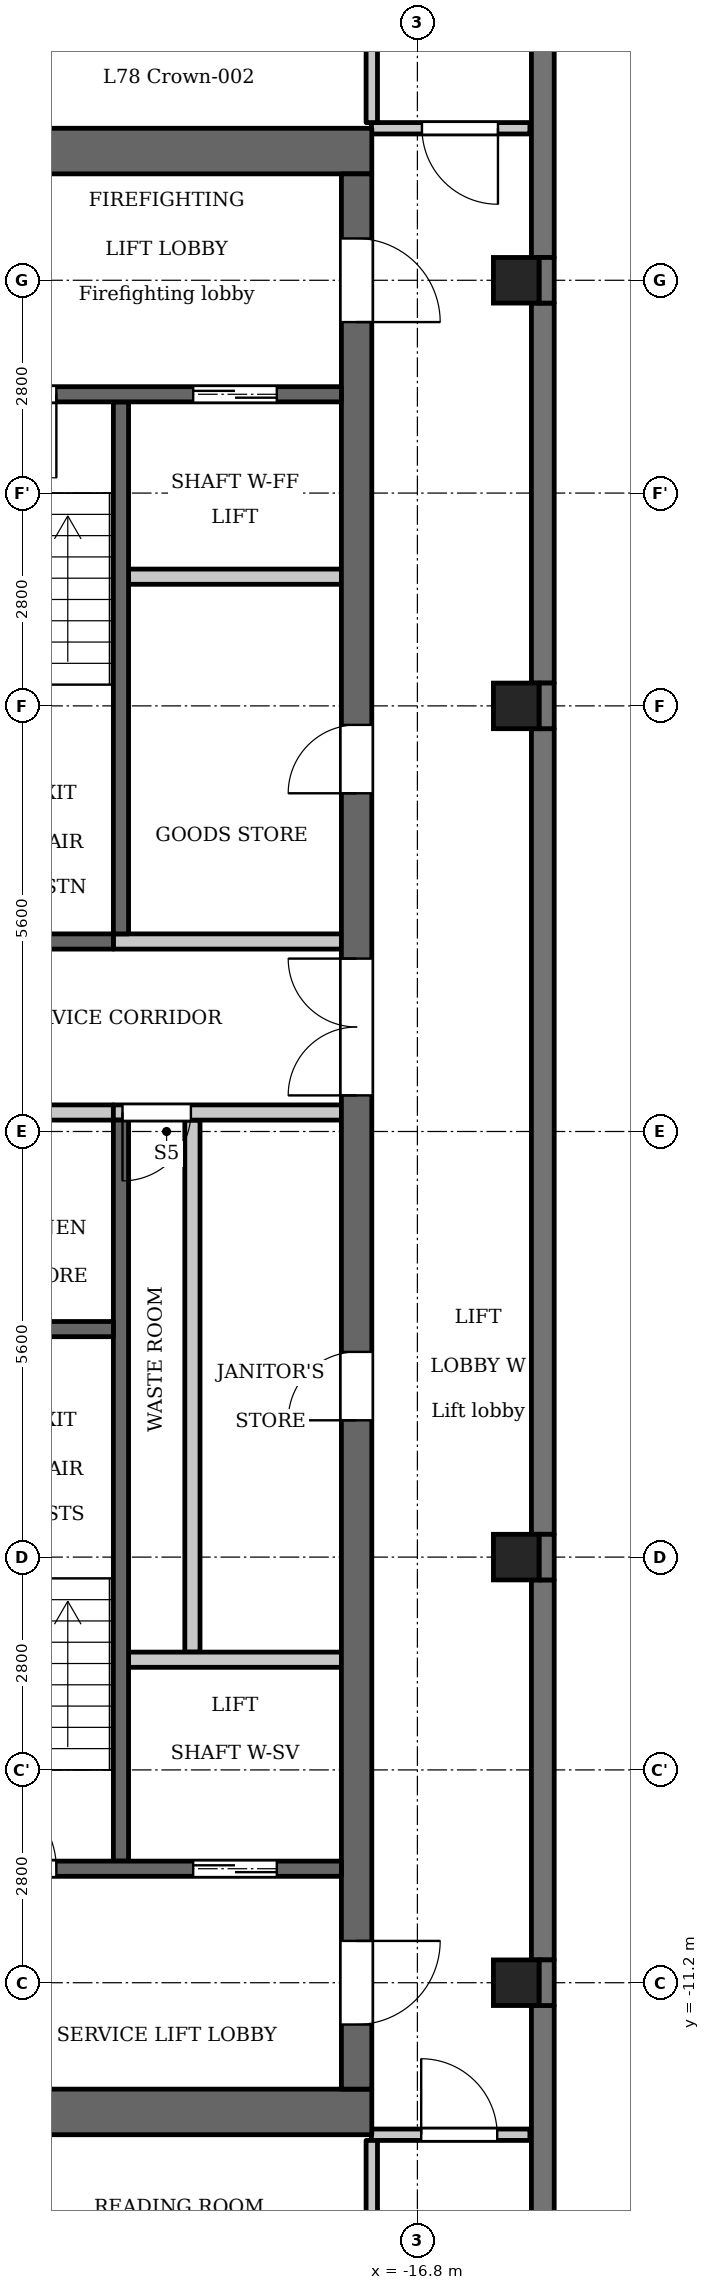
"""IFC4 building model, lengths in metres.
Left out: names, types, materials, properties, quantities, classifications, styles, units other than length and angle.
Written with IfcOpenShell. Run it as: python <this file> out.ifc"""

import sys

from ifc_helpers import new_model, si_unit, direction, frame, frame_2d, origin, origin_2d, place, context, subcontext, project, spatial, polyline, rectangle, outline, extrude, element, fill, save


model = new_model("IFC4")
c1 = context("Model", 3, precision=1e-05, world=origin(), true_north=direction((0.0, 1.0)))
c2 = subcontext(c1, "Body", "Model", "MODEL_VIEW")
j1 = project(units=[si_unit("LENGTHUNIT", "METRE"), si_unit("PLANEANGLEUNIT", "RADIAN")], contexts=[c1])
p1 = place(None, origin())
s1 = spatial("IfcSite", under=j1, at=p1, CompositionType="ELEMENT")
p2 = place(p1, origin())
s2 = spatial("IfcBuilding", under=s1, at=p2, CompositionType="ELEMENT")
p3 = place(p2, frame((0.0, 0.0, 303.4)))
s3 = spatial("IfcBuildingStorey", under=s2, at=p3, CompositionType="ELEMENT", Elevation=303.4)
for number, where, z_axis, x_axis in (
    (1, (-15.5, -11.2, 0.0), (0.0, 0.0, 1.0), (1.0, 0.0, 0.0)),
    (2, (-15.5, -5.6, 0.0), (0.0, 0.0, 1.0), (1.0, 0.0, 0.0)),
    (3, (-15.5, 5.6, 0.0), (0.0, 0.0, 1.0), (1.0, 0.0, 0.0)),
    (4, (-15.5, 11.2, 0.0), (0.0, 0.0, 1.0), (1.0, 0.0, 0.0)),
):
    element("IfcColumn", number, at=place(p3, frame(where, z_axis=z_axis, x_axis=x_axis)), inside=s3, PredefinedType="COLUMN", context=c2, shape_type="SweptSolid", body=[
        extrude(rectangle(XDim=0.6, YDim=0.6, at=origin_2d()), origin(), (0.0, 0.0, 1.0), 3.5),
    ])
p4 = place(p3, frame((-15.15, -18.8, 0.0), z_axis=(0.0, 0.0, 1.0), x_axis=(0.0, 1.0, 0.0)))
e5 = element("IfcWall", 5, at=p4, inside=s3, PredefinedType="SOLIDWALL", context=c2, shape_type="SweptSolid", body=[
    extrude(rectangle(XDim=7.3, YDim=0.3, at=frame_2d((3.65, 0.0))), origin(), (0.0, 0.0, 1.0), 3.2),
])
p5 = place(p4, frame((1.863, 0.0, 0.9)))
e6 = element("IfcOpeningElement", 6, at=p5, cuts=e5, PredefinedType="OPENING", context=c2, shape_type="SweptSolid", body=[
    extrude(rectangle(XDim=1.8, YDim=1.25, at=frame_2d((0.9, 0.625))), frame((0.0, 0.16, 0.0), z_axis=(0.0, -1.0, 0.0), x_axis=(1.0, 0.0, 0.0)), (0.0, 0.0, 1.0), 0.32),
])
p6 = place(p3, frame((-15.15, -10.9, 0.0), z_axis=(0.0, 0.0, 1.0), x_axis=(0.0, 1.0, 0.0)))
e7 = element("IfcWall", 7, at=p6, inside=s3, PredefinedType="SOLIDWALL", context=c2, shape_type="SweptSolid", body=[
    extrude(rectangle(XDim=5.0, YDim=0.3, at=frame_2d((2.5, 0.0))), origin(), (0.0, 0.0, 1.0), 3.2),
])
p7 = place(p3, frame((-15.15, -5.3, 0.0), z_axis=(0.0, 0.0, 1.0), x_axis=(0.0, 1.0, 0.0)))
e8 = element("IfcWall", 8, at=p7, inside=s3, PredefinedType="SOLIDWALL", context=c2, shape_type="SweptSolid", body=[
    extrude(rectangle(XDim=10.6, YDim=0.3, at=frame_2d((5.3, 0.0))), origin(), (0.0, 0.0, 1.0), 3.2),
])
p8 = place(p3, frame((-15.15, 5.9, 0.0), z_axis=(0.0, 0.0, 1.0), x_axis=(0.0, 1.0, 0.0)))
e9 = element("IfcWall", 9, at=p8, inside=s3, PredefinedType="SOLIDWALL", context=c2, shape_type="SweptSolid", body=[
    extrude(rectangle(XDim=5.0, YDim=0.3, at=frame_2d((2.5, 0.0))), origin(), (0.0, 0.0, 1.0), 3.2),
])
p9 = place(p3, frame((-15.15, 11.5, 0.0), z_axis=(0.0, 0.0, 1.0), x_axis=(0.0, 1.0, 0.0)))
e10 = element("IfcWall", 10, at=p9, inside=s3, PredefinedType="SOLIDWALL", context=c2, shape_type="SweptSolid", body=[
    extrude(rectangle(XDim=7.3, YDim=0.3, at=frame_2d((3.65, 0.0))), origin(), (0.0, 0.0, 1.0), 3.2),
])
p10 = place(p9, frame((3.637, 0.0, 0.9)))
e11 = element("IfcOpeningElement", 11, at=p10, cuts=e10, PredefinedType="OPENING", context=c2, shape_type="SweptSolid", body=[
    extrude(rectangle(XDim=1.8, YDim=1.25, at=frame_2d((0.9, 0.625))), frame((0.0, 0.16, 0.0), z_axis=(0.0, -1.0, 0.0), x_axis=(1.0, 0.0, 0.0)), (0.0, 0.0, 1.0), 0.32),
])
p11 = place(p3, frame((-20.7, 2.6, 0.0), z_axis=(0.0, 0.0, 1.0), x_axis=(0.0, 1.0, 0.0)))
e12 = element("IfcWall", 12, at=p11, inside=s3, PredefinedType="SHEAR", context=c2, shape_type="SweptSolid", body=[
    extrude(rectangle(XDim=7.0, YDim=0.2, at=frame_2d((3.5, 0.0))), origin(), (0.0, 0.0, 1.0), 3.2),
])
p12 = place(p3, frame((-20.7, -9.6, 0.0), z_axis=(0.0, 0.0, 1.0), x_axis=(0.0, 1.0, 0.0)))
e13 = element("IfcWall", 13, at=p12, inside=s3, PredefinedType="SHEAR", context=c2, shape_type="SweptSolid", body=[
    extrude(rectangle(XDim=9.75, YDim=0.2, at=frame_2d((4.875, 0.0))), origin(), (0.0, 0.0, 1.0), 3.2),
])
p13 = place(p3, frame((-20.8, 2.5, 0.0), z_axis=(0.0, 0.0, 1.0), x_axis=(-1.0, 0.0, 0.0)))
e14 = element("IfcWall", 14, at=p13, inside=s3, PredefinedType="SHEAR", context=c2, shape_type="SweptSolid", body=[
    extrude(rectangle(XDim=2.8, YDim=0.2, at=frame_2d((1.4, 0.0))), origin(), (0.0, 0.0, 1.0), 3.2),
])
p14 = place(p3, frame((-20.8, 0.25, 0.0), z_axis=(0.0, 0.0, 1.0), x_axis=(-1.0, 0.0, 0.0)))
e15 = element("IfcWall", 15, at=p14, inside=s3, PredefinedType="PARTITIONING", context=c2, shape_type="SweptSolid", body=[
    extrude(rectangle(XDim=2.8, YDim=0.2, at=frame_2d((1.4, 0.0))), origin(), (0.0, 0.0, 1.0), 3.2),
])
p15 = place(p14, frame((0.95, 0.0, 0.0)))
e16 = element("IfcOpeningElement", 16, at=p15, cuts=e15, PredefinedType="OPENING", context=c2, shape_type="SweptSolid", body=[
    extrude(rectangle(XDim=0.9, YDim=2.1, at=frame_2d((0.45, 1.05))), frame((0.0, 0.11, 0.0), z_axis=(0.0, -1.0, 0.0), x_axis=(1.0, 0.0, 0.0)), (0.0, 0.0, 1.0), 0.22),
])
for number, where, z_axis, x_axis in (
    (17, (-17.4, 12.9, 0.0), (0.0, 0.0, 1.0), (-1.0, 0.0, 0.0)),
    (18, (-17.4, -12.9, 0.0), (0.0, 0.0, 1.0), (-1.0, 0.0, 0.0)),
):
    element("IfcWall", number, at=place(p3, frame(where, z_axis=z_axis, x_axis=x_axis)), inside=s3, PredefinedType="SHEAR", context=c2, shape_type="SweptSolid", body=[
        extrude(rectangle(XDim=7.6, YDim=0.6, at=frame_2d((3.8, 0.0))), origin(), (0.0, 0.0, 1.0), 3.2),
    ])
p16 = place(p3, frame((-19.76, -6.85, 0.0), z_axis=(0.0, 0.0, 1.0), x_axis=(0.0, 1.0, 0.0)))
e19 = element("IfcWall", 19, at=p16, inside=s3, PredefinedType="PARTITIONING", context=c2, shape_type="SweptSolid", body=[
    extrude(rectangle(XDim=7.0, YDim=0.2, at=frame_2d((3.5, 0.0))), origin(), (0.0, 0.0, 1.0), 3.2),
])
p17 = place(p3, frame((-17.6, -12.6, 0.0), z_axis=(0.0, 0.0, 1.0), x_axis=(0.0, 1.0, 0.0)))
e20 = element("IfcWall", 20, at=p17, inside=s3, PredefinedType="SHEAR", context=c2, shape_type="SweptSolid", body=[
    extrude(rectangle(XDim=25.2, YDim=0.4, at=frame_2d((12.6, 0.0))), origin(), (0.0, 0.0, 1.0), 3.2),
])
p18 = place(p17, frame((8.8, 0.0, 0.0)))
e21 = element("IfcOpeningElement", 21, at=p18, cuts=e20, PredefinedType="OPENING", context=c2, shape_type="SweptSolid", body=[
    extrude(rectangle(XDim=0.9, YDim=2.1, at=frame_2d((0.45, 1.05))), frame((0.0, 0.21, 0.0), z_axis=(0.0, -1.0, 0.0), x_axis=(1.0, 0.0, 0.0)), (0.0, 0.0, 1.0), 0.42),
])
p19 = place(p17, frame((17.05, 0.0, 0.0)))
e22 = element("IfcOpeningElement", 22, at=p19, cuts=e20, PredefinedType="OPENING", context=c2, shape_type="SweptSolid", body=[
    extrude(rectangle(XDim=0.9, YDim=2.1, at=frame_2d((0.45, 1.05))), frame((0.0, 0.21, 0.0), z_axis=(0.0, -1.0, 0.0), x_axis=(1.0, 0.0, 0.0)), (0.0, 0.0, 1.0), 0.42),
])
p20 = place(p17, frame((23.25, 0.0, 0.0)))
e23 = element("IfcOpeningElement", 23, at=p20, cuts=e20, PredefinedType="OPENING", context=c2, shape_type="SweptSolid", body=[
    extrude(rectangle(XDim=1.1, YDim=2.1, at=frame_2d((0.55, 1.05))), frame((0.0, 0.21, 0.0), z_axis=(0.0, -1.0, 0.0), x_axis=(1.0, 0.0, 0.0)), (0.0, 0.0, 1.0), 0.42),
])
p21 = place(p17, frame((0.85, 0.0, 0.0)))
e24 = element("IfcOpeningElement", 24, at=p21, cuts=e20, PredefinedType="OPENING", context=c2, shape_type="SweptSolid", body=[
    extrude(rectangle(XDim=1.1, YDim=2.1, at=frame_2d((0.55, 1.05))), frame((0.0, 0.21, 0.0), z_axis=(0.0, -1.0, 0.0), x_axis=(1.0, 0.0, 0.0)), (0.0, 0.0, 1.0), 0.42),
])
p22 = place(p17, frame((13.075, 0.0, 0.0)))
e25 = element("IfcOpeningElement", 25, at=p22, cuts=e20, PredefinedType="OPENING", context=c2, shape_type="SweptSolid", body=[
    extrude(rectangle(XDim=1.8, YDim=2.1, at=frame_2d((0.9, 1.05))), frame((0.0, 0.21, 0.0), z_axis=(0.0, -1.0, 0.0), x_axis=(1.0, 0.0, 0.0)), (0.0, 0.0, 1.0), 0.42),
])
p23 = place(p3, frame((-17.8, -9.7, 0.0), z_axis=(0.0, 0.0, 1.0), x_axis=(-1.0, 0.0, 0.0)))
e26 = element("IfcWall", 26, at=p23, inside=s3, PredefinedType="SHEAR", context=c2, shape_type="SweptSolid", body=[
    extrude(rectangle(XDim=5.8, YDim=0.2, at=frame_2d((2.9, 0.0))), origin(), (0.0, 0.0, 1.0), 3.2),
])
p24 = place(p23, frame((0.85, 0.0, 0.0)))
e27 = element("IfcOpeningElement", 27, at=p24, cuts=e26, PredefinedType="OPENING", context=c2, shape_type="SweptSolid", body=[
    extrude(rectangle(XDim=1.1, YDim=2.1, at=frame_2d((0.55, 1.05))), frame((0.0, 0.11, 0.0), z_axis=(0.0, -1.0, 0.0), x_axis=(1.0, 0.0, 0.0)), (0.0, 0.0, 1.0), 0.22),
])
p25 = place(p23, frame((3.75, 0.0, 0.0)))
e28 = element("IfcOpeningElement", 28, at=p25, cuts=e26, PredefinedType="OPENING", context=c2, shape_type="SweptSolid", body=[
    extrude(rectangle(XDim=1.1, YDim=2.1, at=frame_2d((0.55, 1.05))), frame((0.0, 0.11, 0.0), z_axis=(0.0, -1.0, 0.0), x_axis=(1.0, 0.0, 0.0)), (0.0, 0.0, 1.0), 0.22),
])
p26 = place(p3, frame((-17.8, -6.95, 0.0), z_axis=(0.0, 0.0, 1.0), x_axis=(-1.0, 0.0, 0.0)))
e29 = element("IfcWall", 29, at=p26, inside=s3, PredefinedType="PARTITIONING", context=c2, shape_type="SweptSolid", body=[
    extrude(rectangle(XDim=2.8, YDim=0.2, at=frame_2d((1.4, 0.0))), origin(), (0.0, 0.0, 1.0), 3.2),
])
p27 = place(p3, frame((-17.8, 0.25, 0.0), z_axis=(0.0, 0.0, 1.0), x_axis=(-1.0, 0.0, 0.0)))
e30 = element("IfcWall", 30, at=p27, inside=s3, PredefinedType="PARTITIONING", context=c2, shape_type="SweptSolid", body=[
    extrude(rectangle(XDim=3.0, YDim=0.2, at=frame_2d((1.5, 0.0))), origin(), (0.0, 0.0, 1.0), 3.2),
])
p28 = place(p27, frame((1.98, 0.0, 0.0)))
e31 = element("IfcOpeningElement", 31, at=p28, cuts=e30, PredefinedType="OPENING", context=c2, shape_type="SweptSolid", body=[
    extrude(rectangle(XDim=0.9, YDim=2.1, at=frame_2d((0.45, 1.05))), frame((0.0, 0.11, 0.0), z_axis=(0.0, -1.0, 0.0), x_axis=(1.0, 0.0, 0.0)), (0.0, 0.0, 1.0), 0.22),
])
p29 = place(p3, frame((-17.8, 2.5, 0.0), z_axis=(0.0, 0.0, 1.0), x_axis=(-1.0, 0.0, 0.0)))
e32 = element("IfcWall", 32, at=p29, inside=s3, PredefinedType="PARTITIONING", context=c2, shape_type="SweptSolid", body=[
    extrude(rectangle(XDim=3.0, YDim=0.2, at=frame_2d((1.5, 0.0))), origin(), (0.0, 0.0, 1.0), 3.2),
])
p30 = place(p3, frame((-17.8, 7.3, 0.0), z_axis=(0.0, 0.0, 1.0), x_axis=(-1.0, 0.0, 0.0)))
e33 = element("IfcWall", 33, at=p30, inside=s3, PredefinedType="PARTITIONING", context=c2, shape_type="SweptSolid", body=[
    extrude(rectangle(XDim=2.8, YDim=0.2, at=frame_2d((1.4, 0.0))), origin(), (0.0, 0.0, 1.0), 3.2),
])
p31 = place(p3, frame((-17.8, 9.7, 0.0), z_axis=(0.0, 0.0, 1.0), x_axis=(-1.0, 0.0, 0.0)))
e34 = element("IfcWall", 34, at=p31, inside=s3, PredefinedType="SHEAR", context=c2, shape_type="SweptSolid", body=[
    extrude(rectangle(XDim=5.8, YDim=0.2, at=frame_2d((2.9, 0.0))), origin(), (0.0, 0.0, 1.0), 3.2),
])
p32 = place(p31, frame((0.85, 0.0, 0.0)))
e35 = element("IfcOpeningElement", 35, at=p32, cuts=e34, PredefinedType="OPENING", context=c2, shape_type="SweptSolid", body=[
    extrude(rectangle(XDim=1.1, YDim=2.1, at=frame_2d((0.55, 1.05))), frame((0.0, 0.11, 0.0), z_axis=(0.0, -1.0, 0.0), x_axis=(1.0, 0.0, 0.0)), (0.0, 0.0, 1.0), 0.22),
])
p33 = place(p31, frame((3.75, 0.0, 0.0)))
e36 = element("IfcOpeningElement", 36, at=p33, cuts=e34, PredefinedType="OPENING", context=c2, shape_type="SweptSolid", body=[
    extrude(rectangle(XDim=1.1, YDim=2.1, at=frame_2d((0.55, 1.05))), frame((0.0, 0.11, 0.0), z_axis=(0.0, -1.0, 0.0), x_axis=(1.0, 0.0, 0.0)), (0.0, 0.0, 1.0), 0.22),
])
p34 = place(p3, frame((-20.8, -2.6, 0.0), z_axis=(0.0, 0.0, 1.0), x_axis=(-1.0, 0.0, 0.0)))
e37 = element("IfcWall", 37, at=p34, inside=s3, PredefinedType="SHEAR", context=c2, shape_type="SweptSolid", body=[
    extrude(rectangle(XDim=2.6, YDim=0.2, at=frame_2d((1.3, 0.0))), origin(), (0.0, 0.0, 1.0), 3.2),
])
p35 = place(p3, frame((-17.405, -13.2, 0.0), z_axis=(0.0, 0.0, 1.0), x_axis=(1.0, 0.0, 0.0)))
e38 = element("IfcWall", 38, at=p35, inside=s3, PredefinedType="PARTITIONING", context=c2, shape_type="SweptSolid", body=[
    extrude(rectangle(XDim=2.085, YDim=0.15, at=frame_2d((1.042, 0.0))), origin(), (0.0, 0.0, 1.0), 3.2),
])
p36 = place(p35, frame((0.655, 0.0, 0.0)))
e39 = element("IfcOpeningElement", 39, at=p36, cuts=e38, PredefinedType="OPENING", context=c2, shape_type="SweptSolid", body=[
    extrude(rectangle(XDim=1.0, YDim=2.1, at=frame_2d((0.5, 1.05))), frame((0.0, 0.085, 0.0), z_axis=(0.0, -1.0, 0.0), x_axis=(1.0, 0.0, 0.0)), (0.0, 0.0, 1.0), 0.17),
])
p37 = place(p3, frame((-17.405, 13.2, 0.0), z_axis=(0.0, 0.0, 1.0), x_axis=(1.0, 0.0, 0.0)))
e40 = element("IfcWall", 40, at=p37, inside=s3, PredefinedType="PARTITIONING", context=c2, shape_type="SweptSolid", body=[
    extrude(rectangle(XDim=2.085, YDim=0.15, at=frame_2d((1.042, 0.0))), origin(), (0.0, 0.0, 1.0), 3.2),
])
p38 = place(p37, frame((0.665, 0.0, 0.0)))
e41 = element("IfcOpeningElement", 41, at=p38, cuts=e40, PredefinedType="OPENING", context=c2, shape_type="SweptSolid", body=[
    extrude(rectangle(XDim=1.0, YDim=2.1, at=frame_2d((0.5, 1.05))), frame((0.0, 0.085, 0.0), z_axis=(0.0, -1.0, 0.0), x_axis=(1.0, 0.0, 0.0)), (0.0, 0.0, 1.0), 0.17),
])
p39 = place(p3, frame((-17.4, -19.236, 0.0), z_axis=(0.0, 0.0, 1.0), x_axis=(0.0, 1.0, 0.0)))
e42 = element("IfcWall", 42, at=p39, inside=s3, PredefinedType="PARTITIONING", context=c2, shape_type="SweptSolid", body=[
    extrude(rectangle(XDim=5.961, YDim=0.15, at=frame_2d((2.981, 0.0))), origin(), (0.0, 0.0, 1.0), 3.2),
])
p40 = place(p39, frame((0.386, 0.0, 0.0)))
e43 = element("IfcOpeningElement", 43, at=p40, cuts=e42, PredefinedType="OPENING", context=c2, shape_type="SweptSolid", body=[
    extrude(rectangle(XDim=1.0, YDim=2.1, at=frame_2d((0.5, 1.05))), frame((0.0, 0.085, 0.0), z_axis=(0.0, -1.0, 0.0), x_axis=(1.0, 0.0, 0.0)), (0.0, 0.0, 1.0), 0.17),
])
p41 = place(p3, frame((-17.4, 13.275, 0.0), z_axis=(0.0, 0.0, 1.0), x_axis=(0.0, 1.0, 0.0)))
e44 = element("IfcWall", 44, at=p41, inside=s3, PredefinedType="PARTITIONING", context=c2, shape_type="SweptSolid", body=[
    extrude(rectangle(XDim=5.961, YDim=0.15, at=frame_2d((2.981, 0.0))), origin(), (0.0, 0.0, 1.0), 3.2),
])
p42 = place(p41, frame((1.045, 0.0, 0.0)))
e45 = element("IfcOpeningElement", 45, at=p42, cuts=e44, PredefinedType="OPENING", context=c2, shape_type="SweptSolid", body=[
    extrude(rectangle(XDim=1.0, YDim=2.1, at=frame_2d((0.5, 1.05))), frame((0.0, 0.085, 0.0), z_axis=(0.0, -1.0, 0.0), x_axis=(1.0, 0.0, 0.0)), (0.0, 0.0, 1.0), 0.17),
])
p43 = place(p3, origin())
e46 = element("IfcWall", 46, at=p43, inside=s3, PredefinedType="SOLIDWALL", context=c2, shape_type="SweptSolid", body=[
    extrude(outline(polyline([(-15.2, 10.9), (-15.0, 10.9), (-15.0, 11.5), (-15.2, 11.5), (-15.2, 10.9)])), origin(), (0.0, 0.0, 1.0), 3.2),
])
e47 = element("IfcWall", 47, at=p43, inside=s3, PredefinedType="SOLIDWALL", context=c2, shape_type="SweptSolid", body=[
    extrude(outline(polyline([(-15.2, 5.3), (-15.0, 5.3), (-15.0, 5.9), (-15.3, 5.9), (-15.2, 5.9), (-15.2, 5.3)])), origin(), (0.0, 0.0, 1.0), 3.2),
])
e48 = element("IfcWall", 48, at=p43, inside=s3, PredefinedType="SOLIDWALL", context=c2, shape_type="SweptSolid", body=[
    extrude(outline(polyline([(-15.3, -5.9), (-15.0, -5.9), (-15.0, -5.3), (-15.3, -5.3), (-15.2, -5.3), (-15.2, -5.9), (-15.3, -5.9)])), origin(), (0.0, 0.0, 1.0), 3.2),
])
e49 = element("IfcWall", 49, at=p43, inside=s3, PredefinedType="SOLIDWALL", context=c2, shape_type="SweptSolid", body=[
    extrude(outline(polyline([(-15.2, -11.5), (-15.0, -11.5), (-15.0, -10.9), (-15.2, -10.9), (-15.2, -11.5)])), origin(), (0.0, 0.0, 1.0), 3.2),
])
p44 = place(p24, origin())
e50 = element("IfcDoor", 50, at=p44, inside=s3, OperationType="DOUBLE_DOOR_SLIDING", PredefinedType="DOOR", context=c2, shape_type="SweptSolid", body=[
    extrude(rectangle(XDim=1.1, YDim=2.1, at=frame_2d((0.55, 1.05))), frame((0.0, 0.025, 0.0), z_axis=(0.0, -1.0, 0.0), x_axis=(1.0, 0.0, 0.0)), (0.0, 0.0, 1.0), 0.05),
])
fill(e27, e50)
p45 = place(p18, origin())
e51 = element("IfcDoor", 51, at=p45, inside=s3, OperationType="SINGLE_SWING_RIGHT", PredefinedType="DOOR", context=c2, shape_type="SweptSolid", body=[
    extrude(rectangle(XDim=0.9, YDim=2.1, at=frame_2d((0.45, 1.05))), frame((0.0, 0.025, 0.0), z_axis=(0.0, -1.0, 0.0), x_axis=(1.0, 0.0, 0.0)), (0.0, 0.0, 1.0), 0.05),
])
fill(e21, e51)
p46 = place(p28, origin())
e52 = element("IfcDoor", 52, at=p46, inside=s3, OperationType="SINGLE_SWING_LEFT", PredefinedType="DOOR", context=c2, shape_type="SweptSolid", body=[
    extrude(rectangle(XDim=0.9, YDim=2.1, at=frame_2d((0.45, 1.05))), frame((0.0, 0.025, 0.0), z_axis=(0.0, -1.0, 0.0), x_axis=(1.0, 0.0, 0.0)), (0.0, 0.0, 1.0), 0.05),
])
fill(e31, e52)
p47 = place(p19, origin())
e53 = element("IfcDoor", 53, at=p47, inside=s3, OperationType="SINGLE_SWING_RIGHT", PredefinedType="DOOR", context=c2, shape_type="SweptSolid", body=[
    extrude(rectangle(XDim=0.9, YDim=2.1, at=frame_2d((0.45, 1.05))), frame((0.0, 0.025, 0.0), z_axis=(0.0, -1.0, 0.0), x_axis=(1.0, 0.0, 0.0)), (0.0, 0.0, 1.0), 0.05),
])
fill(e22, e53)
p48 = place(p32, origin())
e54 = element("IfcDoor", 54, at=p48, inside=s3, OperationType="DOUBLE_DOOR_SLIDING", PredefinedType="DOOR", context=c2, shape_type="SweptSolid", body=[
    extrude(rectangle(XDim=1.1, YDim=2.1, at=frame_2d((0.55, 1.05))), frame((0.0, 0.025, 0.0), z_axis=(0.0, -1.0, 0.0), x_axis=(1.0, 0.0, 0.0)), (0.0, 0.0, 1.0), 0.05),
])
fill(e35, e54)
p49 = place(p20, origin())
e55 = element("IfcDoor", 55, at=p49, inside=s3, OperationType="SINGLE_SWING_LEFT", PredefinedType="DOOR", context=c2, shape_type="SweptSolid", body=[
    extrude(rectangle(XDim=1.1, YDim=2.1, at=frame_2d((0.55, 1.05))), frame((0.0, 0.025, 0.0), z_axis=(0.0, -1.0, 0.0), x_axis=(1.0, 0.0, 0.0)), (0.0, 0.0, 1.0), 0.05),
])
fill(e23, e55)
p50 = place(p21, origin())
e56 = element("IfcDoor", 56, at=p50, inside=s3, OperationType="SINGLE_SWING_RIGHT", PredefinedType="DOOR", context=c2, shape_type="SweptSolid", body=[
    extrude(rectangle(XDim=1.1, YDim=2.1, at=frame_2d((0.55, 1.05))), frame((0.0, 0.025, 0.0), z_axis=(0.0, -1.0, 0.0), x_axis=(1.0, 0.0, 0.0)), (0.0, 0.0, 1.0), 0.05),
])
fill(e24, e56)
p51 = place(p33, origin())
e57 = element("IfcDoor", 57, at=p51, inside=s3, OperationType="SINGLE_SWING_RIGHT", PredefinedType="DOOR", context=c2, shape_type="SweptSolid", body=[
    extrude(rectangle(XDim=1.1, YDim=2.1, at=frame_2d((0.55, 1.05))), frame((0.0, 0.025, 0.0), z_axis=(0.0, -1.0, 0.0), x_axis=(1.0, 0.0, 0.0)), (0.0, 0.0, 1.0), 0.05),
])
fill(e36, e57)
p52 = place(p25, origin())
e58 = element("IfcDoor", 58, at=p52, inside=s3, OperationType="SINGLE_SWING_RIGHT", PredefinedType="DOOR", context=c2, shape_type="SweptSolid", body=[
    extrude(rectangle(XDim=1.1, YDim=2.1, at=frame_2d((0.55, 1.05))), frame((0.0, 0.025, 0.0), z_axis=(0.0, -1.0, 0.0), x_axis=(1.0, 0.0, 0.0)), (0.0, 0.0, 1.0), 0.05),
])
fill(e28, e58)
p53 = place(p22, origin())
e59 = element("IfcDoor", 59, at=p53, inside=s3, OperationType="DOUBLE_DOOR_SINGLE_SWING", PredefinedType="DOOR", context=c2, shape_type="SweptSolid", body=[
    extrude(rectangle(XDim=1.8, YDim=2.1, at=frame_2d((0.9, 1.05))), frame((0.0, 0.025, 0.0), z_axis=(0.0, -1.0, 0.0), x_axis=(1.0, 0.0, 0.0)), (0.0, 0.0, 1.0), 0.05),
])
fill(e25, e59)
p54 = place(p38, origin())
e60 = element("IfcDoor", 60, at=p54, inside=s3, OperationType="SINGLE_SWING_RIGHT", PredefinedType="DOOR", context=c2, shape_type="SweptSolid", body=[
    extrude(rectangle(XDim=1.0, YDim=2.1, at=frame_2d((0.5, 1.05))), frame((0.0, 0.025, 0.0), z_axis=(0.0, -1.0, 0.0), x_axis=(1.0, 0.0, 0.0)), (0.0, 0.0, 1.0), 0.05),
])
fill(e41, e60)
p55 = place(p36, origin())
e61 = element("IfcDoor", 61, at=p55, inside=s3, OperationType="SINGLE_SWING_RIGHT", PredefinedType="DOOR", context=c2, shape_type="SweptSolid", body=[
    extrude(rectangle(XDim=1.0, YDim=2.1, at=frame_2d((0.5, 1.05))), frame((0.0, 0.025, 0.0), z_axis=(0.0, -1.0, 0.0), x_axis=(1.0, 0.0, 0.0)), (0.0, 0.0, 1.0), 0.05),
])
fill(e39, e61)
save(model, sys.argv[1])
